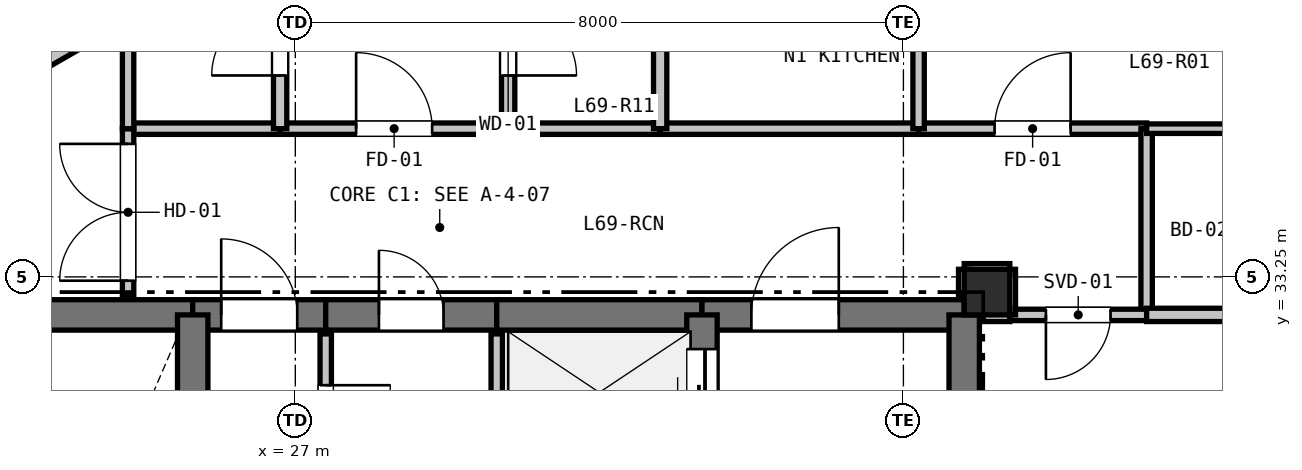
"""IFC4 building model, lengths in metres.
Left out: names, types, materials, properties, quantities, classifications, styles, units other than length and angle.
Written with IfcOpenShell. Run it as: python <this file> out.ifc"""

import sys

from ifc_helpers import new_model, si_unit, direction, frame, frame_2d, origin, origin_2d, place, context, subcontext, project, spatial, rectangle, extrude, element, fill, save


model = new_model("IFC4")
c1 = context("Model", 3, precision=1e-05, world=origin(), true_north=direction((0.0, 1.0)))
c2 = subcontext(c1, "Body", "Model", "MODEL_VIEW")
j1 = project(units=[si_unit("LENGTHUNIT", "METRE"), si_unit("PLANEANGLEUNIT", "RADIAN")], contexts=[c1])
p1 = place(None, origin())
s1 = spatial("IfcSite", under=j1, at=p1, CompositionType="ELEMENT")
p2 = place(p1, origin())
s2 = spatial("IfcBuilding", under=s1, at=p2, CompositionType="ELEMENT")
p3 = place(p2, frame((0.0, 0.0, 246.3)))
s3 = spatial("IfcBuildingStorey", under=s2, at=p3, CompositionType="ELEMENT", Elevation=246.3)
p4 = place(p3, frame((36.1, 33.05, 0.0), z_axis=(0.0, 0.0, 1.0), x_axis=(1.0, 0.0, 0.0)))
e1 = element("IfcColumn", 1, at=p4, inside=s3, PredefinedType="COLUMN", context=c2, shape_type="SweptSolid", body=[
    extrude(rectangle(XDim=0.6, YDim=0.6, at=origin_2d()), origin(), (0.0, 0.0, 1.0), 3.3),
])
p5 = place(p3, frame((20.066, 33.997, 0.0), z_axis=(0.0, 0.0, 1.0), x_axis=(0.866019557082, 0.500010126649, 0.0)))
e2 = element("IfcWall", 2, at=p5, inside=s3, PredefinedType="PARAPET", context=c2, shape_type="SweptSolid", body=[
    extrude(rectangle(XDim=8.228, YDim=0.2, at=frame_2d((4.114, 0.0))), origin(), (0.0, 0.0, 1.0), 0.2),
])
p6 = place(p3, frame((22.2, 32.75, 0.0), z_axis=(0.0, 0.0, 1.0), x_axis=(1.0, 0.0, 0.0)))
e3 = element("IfcWall", 3, at=p6, inside=s3, PredefinedType="SHEAR", context=c2, shape_type="SweptSolid", body=[
    extrude(rectangle(XDim=3.45, YDim=0.4, at=frame_2d((1.725, 0.0))), origin(), (0.0, 0.0, 1.0), 3.02),
])
p7 = place(p3, frame((25.65, 32.75, 0.0), z_axis=(0.0, 0.0, 1.0), x_axis=(1.0, 0.0, 0.0)))
e4 = element("IfcWall", 4, at=p7, inside=s3, PredefinedType="SHEAR", context=c2, shape_type="SweptSolid", body=[
    extrude(rectangle(XDim=1.75, YDim=0.4, at=frame_2d((0.875, 0.0))), origin(), (0.0, 0.0, 1.0), 3.02),
])
p8 = place(p7, frame((0.375, 0.0, 0.0)))
e5 = element("IfcOpeningElement", 5, at=p8, cuts=e4, PredefinedType="OPENING", context=c2, shape_type="SweptSolid", body=[
    extrude(rectangle(XDim=1.0, YDim=2.15, at=frame_2d((0.5, 1.075))), frame((0.0, 0.21, 0.0), z_axis=(0.0, -1.0, 0.0), x_axis=(1.0, 0.0, 0.0)), (0.0, 0.0, 1.0), 0.42),
])
p9 = place(p3, frame((27.4, 32.75, 0.0), z_axis=(0.0, 0.0, 1.0), x_axis=(1.0, 0.0, 0.0)))
e6 = element("IfcWall", 6, at=p9, inside=s3, PredefinedType="SHEAR", context=c2, shape_type="SweptSolid", body=[
    extrude(rectangle(XDim=2.25, YDim=0.4, at=frame_2d((1.125, 0.0))), origin(), (0.0, 0.0, 1.0), 3.02),
])
p10 = place(p9, frame((0.7, 0.0, 0.0)))
e7 = element("IfcOpeningElement", 7, at=p10, cuts=e6, PredefinedType="OPENING", context=c2, shape_type="SweptSolid", body=[
    extrude(rectangle(XDim=0.85, YDim=2.1, at=frame_2d((0.425, 1.05))), frame((0.0, 0.21, 0.0), z_axis=(0.0, -1.0, 0.0), x_axis=(1.0, 0.0, 0.0)), (0.0, 0.0, 1.0), 0.42),
])
p11 = place(p3, frame((29.65, 32.75, 0.0), z_axis=(0.0, 0.0, 1.0), x_axis=(1.0, 0.0, 0.0)))
e8 = element("IfcWall", 8, at=p11, inside=s3, PredefinedType="SHEAR", context=c2, shape_type="SweptSolid", body=[
    extrude(rectangle(XDim=2.7, YDim=0.4, at=frame_2d((1.35, 0.0))), origin(), (0.0, 0.0, 1.0), 3.02),
])
p12 = place(p3, frame((32.35, 32.75, 0.0), z_axis=(0.0, 0.0, 1.0), x_axis=(1.0, 0.0, 0.0)))
e9 = element("IfcWall", 9, at=p12, inside=s3, PredefinedType="SHEAR", context=c2, shape_type="SweptSolid", body=[
    extrude(rectangle(XDim=3.45, YDim=0.4, at=frame_2d((1.725, 0.0))), origin(), (0.0, 0.0, 1.0), 3.02),
])
p13 = place(p12, frame((0.65, 0.0, 0.0)))
e10 = element("IfcOpeningElement", 10, at=p13, cuts=e9, PredefinedType="OPENING", context=c2, shape_type="SweptSolid", body=[
    extrude(rectangle(XDim=1.15, YDim=2.15, at=frame_2d((0.575, 1.075))), frame((0.0, 0.21, 0.0), z_axis=(0.0, -1.0, 0.0), x_axis=(1.0, 0.0, 0.0)), (0.0, 0.0, 1.0), 0.42),
])
p14 = place(p3, frame((35.8, 32.75, 0.0), z_axis=(0.0, 0.0, 1.0), x_axis=(0.0, -1.0, 0.0)))
e11 = element("IfcWall", 11, at=p14, inside=s3, PredefinedType="SHEAR", context=c2, shape_type="SweptSolid", body=[
    extrude(rectangle(XDim=4.65, YDim=0.4, at=frame_2d((2.325, 0.0))), origin(), (0.0, 0.0, 1.0), 3.02),
])
p15 = place(p3, frame((25.65, 27.95, 0.0), z_axis=(0.0, 0.0, 1.0), x_axis=(0.0, 1.0, 0.0)))
e12 = element("IfcWall", 12, at=p15, inside=s3, PredefinedType="SHEAR", context=c2, shape_type="SweptSolid", body=[
    extrude(rectangle(XDim=4.8, YDim=0.4, at=frame_2d((2.4, 0.0))), origin(), (0.0, 0.0, 1.0), 3.02),
])
p16 = place(p3, frame((32.35, 30.75, 0.0), z_axis=(0.0, 0.0, 1.0), x_axis=(0.0, 1.0, 0.0)))
e13 = element("IfcWall", 13, at=p16, inside=s3, PredefinedType="SHEAR", context=c2, shape_type="SweptSolid", body=[
    extrude(rectangle(XDim=2.0, YDim=0.4, at=frame_2d((1.0, 0.0))), origin(), (0.0, 0.0, 1.0), 3.02),
])
p17 = place(p16, frame((0.45, 0.0, 0.0)))
e14 = element("IfcOpeningElement", 14, at=p17, cuts=e13, PredefinedType="OPENING", context=c2, shape_type="SweptSolid", body=[
    extrude(rectangle(XDim=1.1, YDim=2.15, at=frame_2d((0.55, 1.075))), frame((0.0, 0.21, 0.0), z_axis=(0.0, -1.0, 0.0), x_axis=(1.0, 0.0, 0.0)), (0.0, 0.0, 1.0), 0.42),
])
p18 = place(p3, frame((29.65, 30.3, 0.0), z_axis=(0.0, 0.0, 1.0), x_axis=(0.0, 1.0, 0.0)))
e15 = element("IfcWall", 15, at=p18, inside=s3, PredefinedType="PARTITIONING", context=c2, shape_type="SweptSolid", body=[
    extrude(rectangle(XDim=2.2, YDim=0.15, at=frame_2d((1.1, 0.0))), origin(), (0.0, 0.0, 1.0), 3.02),
])
p19 = place(p3, frame((27.4, 32.5, 0.0), z_axis=(0.0, 0.0, 1.0), x_axis=(0.0, -1.0, 0.0)))
e16 = element("IfcWall", 16, at=p19, inside=s3, PredefinedType="PARTITIONING", context=c2, shape_type="SweptSolid", body=[
    extrude(rectangle(XDim=2.2, YDim=0.15, at=frame_2d((1.1, 0.0))), origin(), (0.0, 0.0, 1.0), 3.02),
])
p20 = place(p19, frame((0.675, 0.0, 0.0)))
e17 = element("IfcOpeningElement", 17, at=p20, cuts=e16, PredefinedType="OPENING", context=c2, shape_type="SweptSolid", body=[
    extrude(rectangle(XDim=0.85, YDim=2.1, at=frame_2d((0.425, 1.05))), frame((0.0, 0.085, 0.0), z_axis=(0.0, -1.0, 0.0), x_axis=(1.0, 0.0, 0.0)), (0.0, 0.0, 1.0), 0.17),
])
p21 = place(p3, frame((24.8, 35.2, 0.0), z_axis=(0.0, 0.0, 1.0), x_axis=(1.0, 0.0, 0.0)))
e18 = element("IfcWall", 18, at=p21, inside=s3, PredefinedType="PARTITIONING", context=c2, shape_type="SweptSolid", body=[
    extrude(rectangle(XDim=2.0, YDim=0.15, at=frame_2d((1.0, 0.0))), origin(), (0.0, 0.0, 1.0), 3.02),
])
p22 = place(p3, frame((26.8, 35.2, 0.0), z_axis=(0.0, 0.0, 1.0), x_axis=(1.0, 0.0, 0.0)))
e19 = element("IfcWall", 19, at=p22, inside=s3, PredefinedType="PARTITIONING", context=c2, shape_type="SweptSolid", body=[
    extrude(rectangle(XDim=3.0, YDim=0.15, at=frame_2d((1.5, 0.0))), origin(), (0.0, 0.0, 1.0), 3.02),
])
p23 = place(p22, frame((1.0, 0.0, 0.0)))
e20 = element("IfcOpeningElement", 20, at=p23, cuts=e19, PredefinedType="OPENING", context=c2, shape_type="SweptSolid", body=[
    extrude(rectangle(XDim=1.0, YDim=2.15, at=frame_2d((0.5, 1.075))), frame((0.0, 0.085, 0.0), z_axis=(0.0, -1.0, 0.0), x_axis=(1.0, 0.0, 0.0)), (0.0, 0.0, 1.0), 0.17),
])
p24 = place(p3, frame((29.8, 35.2, 0.0), z_axis=(0.0, 0.0, 1.0), x_axis=(1.0, 0.0, 0.0)))
e21 = element("IfcWall", 21, at=p24, inside=s3, PredefinedType="PARTITIONING", context=c2, shape_type="SweptSolid", body=[
    extrude(rectangle(XDim=2.0, YDim=0.15, at=frame_2d((1.0, 0.0))), origin(), (0.0, 0.0, 1.0), 3.02),
])
p25 = place(p3, frame((31.8, 35.2, 0.0), z_axis=(0.0, 0.0, 1.0), x_axis=(1.0, 0.0, 0.0)))
e22 = element("IfcWall", 22, at=p25, inside=s3, PredefinedType="PARTITIONING", context=c2, shape_type="SweptSolid", body=[
    extrude(rectangle(XDim=3.4, YDim=0.15, at=frame_2d((1.7, 0.0))), origin(), (0.0, 0.0, 1.0), 3.02),
])
p26 = place(p3, frame((35.2, 35.2, 0.0), z_axis=(0.0, 0.0, 1.0), x_axis=(1.0, 0.0, 0.0)))
e23 = element("IfcWall", 23, at=p26, inside=s3, PredefinedType="PARTITIONING", context=c2, shape_type="SweptSolid", body=[
    extrude(rectangle(XDim=3.0, YDim=0.15, at=frame_2d((1.5, 0.0))), origin(), (0.0, 0.0, 1.0), 2.468),
])
p27 = place(p26, frame((1.0, 0.0, 0.0)))
e24 = element("IfcOpeningElement", 24, at=p27, cuts=e23, PredefinedType="OPENING", context=c2, shape_type="SweptSolid", body=[
    extrude(rectangle(XDim=1.0, YDim=2.15, at=frame_2d((0.5, 1.075))), frame((0.0, 0.085, 0.0), z_axis=(0.0, -1.0, 0.0), x_axis=(1.0, 0.0, 0.0)), (0.0, 0.0, 1.0), 0.17),
])
p28 = place(p3, frame((38.2, 35.2, 0.0), z_axis=(0.0, 0.0, 1.0), x_axis=(0.0, -1.0, 0.0)))
e25 = element("IfcWall", 25, at=p28, inside=s3, PredefinedType="PARTITIONING", context=c2, shape_type="SweptSolid", body=[
    extrude(rectangle(XDim=2.45, YDim=0.15, at=frame_2d((1.225, 0.0))), origin(), (0.0, 0.0, 1.0), 3.02),
])
p29 = place(p3, frame((38.2, 32.75, 0.0), z_axis=(0.0, 0.0, 1.0), x_axis=(-1.0, 0.0, 0.0)))
e26 = element("IfcWall", 26, at=p29, inside=s3, PredefinedType="PARTITIONING", context=c2, shape_type="SweptSolid", body=[
    extrude(rectangle(XDim=1.8, YDim=0.15, at=frame_2d((0.9, 0.0))), origin(), (0.0, 0.0, 1.0), 3.02),
])
p30 = place(p29, frame((0.475, 0.0, 0.0)))
e27 = element("IfcOpeningElement", 27, at=p30, cuts=e26, PredefinedType="OPENING", context=c2, shape_type="SweptSolid", body=[
    extrude(rectangle(XDim=0.85, YDim=2.1, at=frame_2d((0.425, 1.05))), frame((0.0, 0.085, 0.0), z_axis=(0.0, -1.0, 0.0), x_axis=(1.0, 0.0, 0.0)), (0.0, 0.0, 1.0), 0.17),
])
p31 = place(p3, frame((36.4, 32.75, 0.0), z_axis=(0.0, 0.0, 1.0), x_axis=(0.0, 1.0, 0.0)))
e28 = element("IfcWall", 28, at=p31, inside=s3, PredefinedType="PARTITIONING", context=c2, shape_type="SweptSolid", body=[
    extrude(rectangle(XDim=0.6, YDim=0.15, at=frame_2d((0.3, 0.0))), origin(), (0.0, 0.0, 1.0), 2.468),
])
p32 = place(p3, frame((36.4, 33.35, 0.0), z_axis=(0.0, 0.0, 1.0), x_axis=(-1.0, 0.0, 0.0)))
e29 = element("IfcWall", 29, at=p32, inside=s3, PredefinedType="PARTITIONING", context=c2, shape_type="SweptSolid", body=[
    extrude(rectangle(XDim=0.6, YDim=0.15, at=frame_2d((0.3, 0.0))), origin(), (0.0, 0.0, 1.0), 2.468),
])
p33 = place(p3, frame((35.8, 33.35, 0.0), z_axis=(0.0, 0.0, 1.0), x_axis=(0.0, -1.0, 0.0)))
e30 = element("IfcWall", 30, at=p33, inside=s3, PredefinedType="PARTITIONING", context=c2, shape_type="SweptSolid", body=[
    extrude(rectangle(XDim=0.35, YDim=0.15, at=frame_2d((0.175, 0.0))), origin(), (0.0, 0.0, 1.0), 2.545),
])
p34 = place(p3, frame((24.8, 33.0, 0.0), z_axis=(0.0, 0.0, 1.0), x_axis=(0.0, 1.0, 0.0)))
e31 = element("IfcWall", 31, at=p34, inside=s3, PredefinedType="PARTITIONING", context=c2, shape_type="SweptSolid", body=[
    extrude(rectangle(XDim=2.2, YDim=0.15, at=frame_2d((1.1, 0.0))), origin(), (0.0, 0.0, 1.0), 2.545),
])
p35 = place(p34, frame((0.2, 0.0, 0.0)))
e32 = element("IfcOpeningElement", 32, at=p35, cuts=e31, PredefinedType="OPENING", context=c2, shape_type="SweptSolid", body=[
    extrude(rectangle(XDim=1.8, YDim=2.2, at=frame_2d((0.9, 1.1))), frame((0.0, 0.085, 0.0), z_axis=(0.0, -1.0, 0.0), x_axis=(1.0, 0.0, 0.0)), (0.0, 0.0, 1.0), 0.17),
])
p36 = place(p3, frame((29.8, 37.5, 0.0), z_axis=(0.0, 0.0, 1.0), x_axis=(0.0, -1.0, 0.0)))
e33 = element("IfcWall", 33, at=p36, inside=s3, PredefinedType="PLUMBINGWALL", context=c2, shape_type="SweptSolid", body=[
    extrude(rectangle(XDim=2.3, YDim=0.175, at=frame_2d((1.15, 0.0))), origin(), (0.0, 0.0, 1.0), 3.02),
])
p37 = place(p36, frame((0.7, 0.0, 0.0)))
e34 = element("IfcOpeningElement", 34, at=p37, cuts=e33, PredefinedType="OPENING", context=c2, shape_type="SweptSolid", body=[
    extrude(rectangle(XDim=0.9, YDim=2.1, at=frame_2d((0.45, 1.05))), frame((0.0, 0.097, 0.0), z_axis=(0.0, -1.0, 0.0), x_axis=(1.0, 0.0, 0.0)), (0.0, 0.0, 1.0), 0.195),
])
p38 = place(p3, frame((26.8, 35.2, 0.0), z_axis=(0.0, 0.0, 1.0), x_axis=(0.0, 1.0, 0.0)))
e35 = element("IfcWall", 35, at=p38, inside=s3, PredefinedType="PLUMBINGWALL", context=c2, shape_type="SweptSolid", body=[
    extrude(rectangle(XDim=2.3, YDim=0.175, at=frame_2d((1.15, 0.0))), origin(), (0.0, 0.0, 1.0), 2.365),
])
p39 = place(p38, frame((0.7, 0.0, 0.0)))
e36 = element("IfcOpeningElement", 36, at=p39, cuts=e35, PredefinedType="OPENING", context=c2, shape_type="SweptSolid", body=[
    extrude(rectangle(XDim=0.9, YDim=2.1, at=frame_2d((0.45, 1.05))), frame((0.0, 0.097, 0.0), z_axis=(0.0, -1.0, 0.0), x_axis=(1.0, 0.0, 0.0)), (0.0, 0.0, 1.0), 0.195),
])
p40 = place(p3, frame((36.05, 32.75, 0.0), z_axis=(0.0, 0.0, 1.0), x_axis=(1.0, 0.0, 0.0)))
e37 = element("IfcWall", 37, at=p40, inside=s3, PredefinedType="PLUMBINGWALL", context=c2, shape_type="SweptSolid", body=[
    extrude(rectangle(XDim=0.35, YDim=0.175, at=frame_2d((0.175, 0.0))), origin(), (0.0, 0.0, 1.0), 2.545),
])
p41 = place(p3, frame((38.2, 32.75, 0.0), z_axis=(0.0, 0.0, 1.0), x_axis=(1.0, 0.0, 0.0)))
e38 = element("IfcWall", 38, at=p41, inside=s3, PredefinedType="PLUMBINGWALL", context=c2, shape_type="SweptSolid", body=[
    extrude(rectangle(XDim=1.406, YDim=0.175, at=frame_2d((0.703, 0.0))), origin(), (0.0, 0.0, 1.0), 2.365),
])
p42 = place(p3, frame((24.8, 35.2, 0.0), z_axis=(0.0, 0.0, 1.0), x_axis=(0.0, 1.0, 0.0)))
e39 = element("IfcWall", 39, at=p42, inside=s3, PredefinedType="PARTITIONING", context=c2, shape_type="SweptSolid", body=[
    extrude(rectangle(XDim=1.484, YDim=0.15, at=frame_2d((0.742, 0.0))), origin(), (0.0, 0.0, 1.0), 2.365),
])
p43 = place(p3, frame((31.8, 37.5, 0.0), z_axis=(0.0, 0.0, 1.0), x_axis=(0.0, -1.0, 0.0)))
e40 = element("IfcWall", 40, at=p43, inside=s3, PredefinedType="PLUMBINGWALL", context=c2, shape_type="SweptSolid", body=[
    extrude(rectangle(XDim=2.3, YDim=0.175, at=frame_2d((1.15, 0.0))), origin(), (0.0, 0.0, 1.0), 3.02),
])
p44 = place(p3, frame((35.2, 37.5, 0.0), z_axis=(0.0, 0.0, 1.0), x_axis=(0.0, -1.0, 0.0)))
e41 = element("IfcWall", 41, at=p44, inside=s3, PredefinedType="PARTITIONING", context=c2, shape_type="SweptSolid", body=[
    extrude(rectangle(XDim=2.3, YDim=0.15, at=frame_2d((1.15, 0.0))), origin(), (0.0, 0.0, 1.0), 3.02),
])
p45 = place(p3, frame((39.606, 35.2, 0.0), z_axis=(0.0, 0.0, 1.0), x_axis=(-1.0, 0.0, 0.0)))
e42 = element("IfcWall", 42, at=p45, inside=s3, PredefinedType="PARTITIONING", context=c2, shape_type="SweptSolid", body=[
    extrude(rectangle(XDim=1.406, YDim=0.125, at=frame_2d((0.703, 0.0))), origin(), (0.0, 0.0, 1.0), 2.365),
])
p46 = place(p8, origin())
e43 = element("IfcDoor", 43, at=p46, inside=s3, OperationType="SINGLE_SWING_LEFT", PredefinedType="DOOR", context=c2, shape_type="SweptSolid", body=[
    extrude(rectangle(XDim=1.0, YDim=2.15, at=frame_2d((0.5, 1.075))), frame((0.0, 0.025, 0.0), z_axis=(0.0, -1.0, 0.0), x_axis=(1.0, 0.0, 0.0)), (0.0, 0.0, 1.0), 0.05),
])
fill(e5, e43)
p47 = place(p17, origin())
e44 = element("IfcDoor", 44, at=p47, inside=s3, OperationType="SLIDING_TO_LEFT", PredefinedType="DOOR", context=c2, shape_type="SweptSolid", body=[
    extrude(rectangle(XDim=1.1, YDim=2.15, at=frame_2d((0.55, 1.075))), frame((0.0, 0.025, 0.0), z_axis=(0.0, -1.0, 0.0), x_axis=(1.0, 0.0, 0.0)), (0.0, 0.0, 1.0), 0.05),
])
fill(e14, e44)
p48 = place(p13, origin())
e45 = element("IfcDoor", 45, at=p48, inside=s3, OperationType="SINGLE_SWING_RIGHT", PredefinedType="DOOR", context=c2, shape_type="SweptSolid", body=[
    extrude(rectangle(XDim=1.15, YDim=2.15, at=frame_2d((0.575, 1.075))), frame((0.0, 0.025, 0.0), z_axis=(0.0, -1.0, 0.0), x_axis=(1.0, 0.0, 0.0)), (0.0, 0.0, 1.0), 0.05),
])
fill(e10, e45)
p49 = place(p20, origin())
e46 = element("IfcDoor", 46, at=p49, inside=s3, OperationType="SINGLE_SWING_LEFT", PredefinedType="DOOR", context=c2, shape_type="SweptSolid", body=[
    extrude(rectangle(XDim=0.85, YDim=2.1, at=frame_2d((0.425, 1.05))), frame((0.0, 0.025, 0.0), z_axis=(0.0, -1.0, 0.0), x_axis=(1.0, 0.0, 0.0)), (0.0, 0.0, 1.0), 0.05),
])
fill(e17, e46)
p50 = place(p23, origin())
e47 = element("IfcDoor", 47, at=p50, inside=s3, OperationType="SINGLE_SWING_LEFT", PredefinedType="DOOR", context=c2, shape_type="SweptSolid", body=[
    extrude(rectangle(XDim=1.0, YDim=2.15, at=frame_2d((0.5, 1.075))), frame((0.0, 0.025, 0.0), z_axis=(0.0, -1.0, 0.0), x_axis=(1.0, 0.0, 0.0)), (0.0, 0.0, 1.0), 0.05),
])
fill(e20, e47)
p51 = place(p30, origin())
e48 = element("IfcDoor", 48, at=p51, inside=s3, OperationType="SINGLE_SWING_RIGHT", PredefinedType="DOOR", context=c2, shape_type="SweptSolid", body=[
    extrude(rectangle(XDim=0.85, YDim=2.1, at=frame_2d((0.425, 1.05))), frame((0.0, 0.025, 0.0), z_axis=(0.0, -1.0, 0.0), x_axis=(1.0, 0.0, 0.0)), (0.0, 0.0, 1.0), 0.05),
])
fill(e27, e48)
p52 = place(p10, origin())
e49 = element("IfcDoor", 49, at=p52, inside=s3, OperationType="SINGLE_SWING_LEFT", PredefinedType="DOOR", context=c2, shape_type="SweptSolid", body=[
    extrude(rectangle(XDim=0.85, YDim=2.1, at=frame_2d((0.425, 1.05))), frame((0.0, 0.025, 0.0), z_axis=(0.0, -1.0, 0.0), x_axis=(1.0, 0.0, 0.0)), (0.0, 0.0, 1.0), 0.05),
])
fill(e7, e49)
p53 = place(p27, origin())
e50 = element("IfcDoor", 50, at=p53, inside=s3, OperationType="SINGLE_SWING_RIGHT", PredefinedType="DOOR", context=c2, shape_type="SweptSolid", body=[
    extrude(rectangle(XDim=1.0, YDim=2.15, at=frame_2d((0.5, 1.075))), frame((0.0, 0.025, 0.0), z_axis=(0.0, -1.0, 0.0), x_axis=(1.0, 0.0, 0.0)), (0.0, 0.0, 1.0), 0.05),
])
fill(e24, e50)
p54 = place(p35, origin())
e51 = element("IfcDoor", 51, at=p54, inside=s3, OperationType="DOUBLE_DOOR_SINGLE_SWING", PredefinedType="DOOR", context=c2, shape_type="SweptSolid", body=[
    extrude(rectangle(XDim=1.8, YDim=2.2, at=frame_2d((0.9, 1.1))), frame((0.0, 0.025, 0.0), z_axis=(0.0, -1.0, 0.0), x_axis=(1.0, 0.0, 0.0)), (0.0, 0.0, 1.0), 0.05),
])
fill(e32, e51)
p55 = place(p39, origin())
e52 = element("IfcDoor", 52, at=p55, inside=s3, OperationType="SINGLE_SWING_LEFT", PredefinedType="DOOR", context=c2, shape_type="SweptSolid", body=[
    extrude(rectangle(XDim=0.9, YDim=2.1, at=frame_2d((0.45, 1.05))), frame((0.0, 0.025, 0.0), z_axis=(0.0, -1.0, 0.0), x_axis=(1.0, 0.0, 0.0)), (0.0, 0.0, 1.0), 0.05),
])
fill(e36, e52)
p56 = place(p37, origin())
e53 = element("IfcDoor", 53, at=p56, inside=s3, OperationType="SINGLE_SWING_RIGHT", PredefinedType="DOOR", context=c2, shape_type="SweptSolid", body=[
    extrude(rectangle(XDim=0.9, YDim=2.1, at=frame_2d((0.45, 1.05))), frame((0.0, 0.025, 0.0), z_axis=(0.0, -1.0, 0.0), x_axis=(1.0, 0.0, 0.0)), (0.0, 0.0, 1.0), 0.05),
])
fill(e34, e53)
save(model, sys.argv[1])
